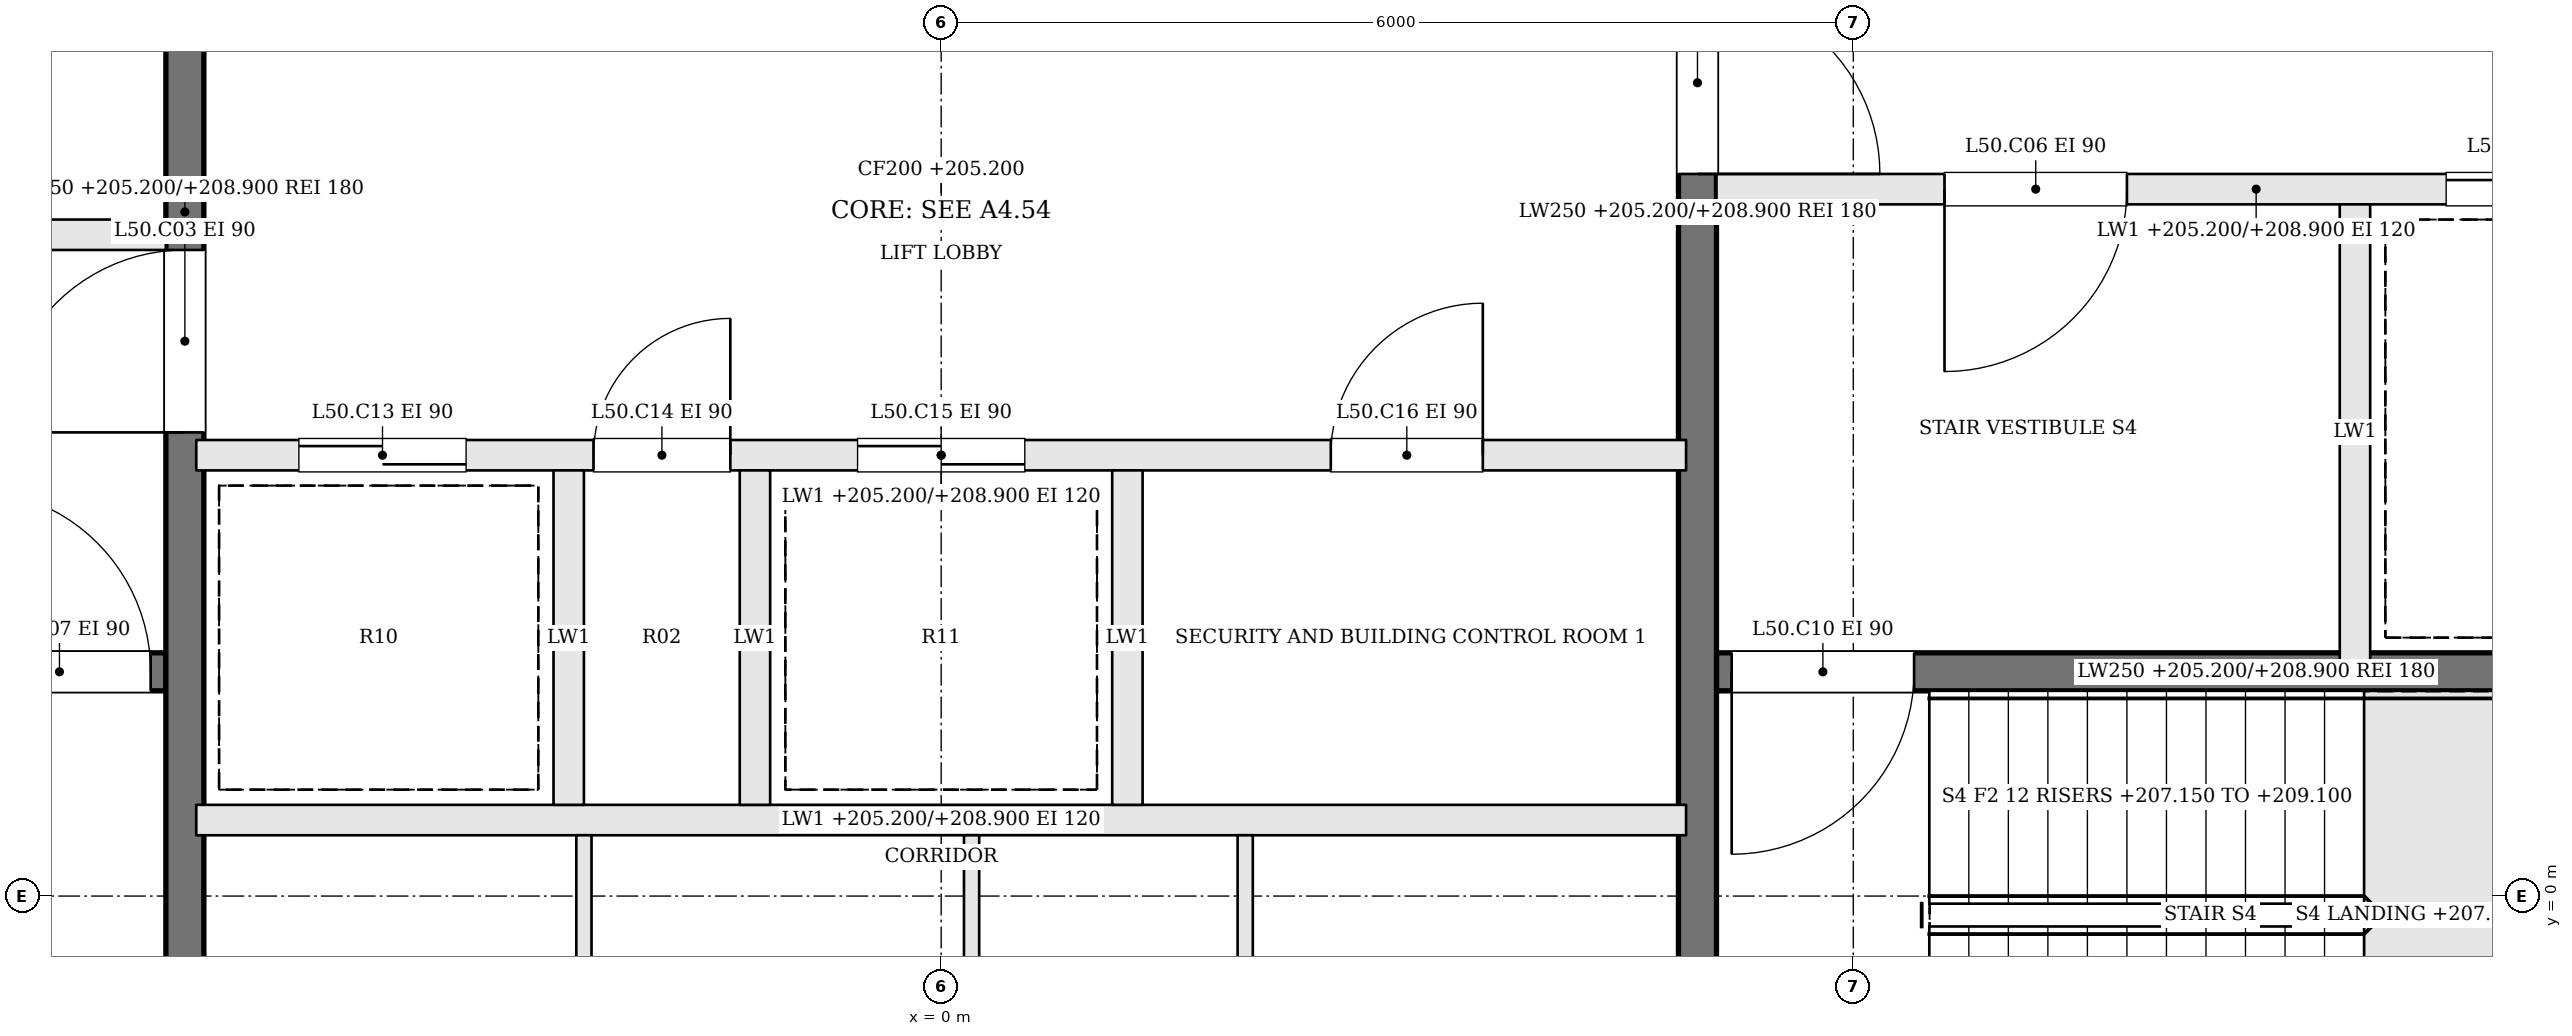
"""IFC4 building model, lengths in metres.
Left out: names, types, materials, properties, quantities, classifications, styles, units other than length and angle.
Written with IfcOpenShell. Run it as: python <this file> out.ifc"""

import sys

from ifc_helpers import new_model, si_unit, direction, frame, frame_2d, origin, place, context, subcontext, project, spatial, rectangle, extrude, element, fill, save


model = new_model("IFC4")
c1 = context("Model", 3, precision=1e-05, world=origin(), true_north=direction((0.0, 1.0)))
c2 = subcontext(c1, "Body", "Model", "MODEL_VIEW")
j1 = project(units=[si_unit("LENGTHUNIT", "METRE"), si_unit("PLANEANGLEUNIT", "RADIAN")], contexts=[c1])
p1 = place(None, origin())
s1 = spatial("IfcSite", under=j1, at=p1, CompositionType="ELEMENT")
p2 = place(p1, origin())
s2 = spatial("IfcBuilding", under=s1, at=p2, CompositionType="ELEMENT")
p3 = place(p2, frame((0.0, 0.0, 205.2)))
s3 = spatial("IfcBuildingStorey", under=s2, at=p3, CompositionType="ELEMENT", Elevation=205.2)
p4 = place(p3, frame((-12.2, 1.475, 0.0), z_axis=(0.0, 0.0, 1.0), x_axis=(1.0, 0.0, 0.0)))
e1 = element("IfcWall", 1, at=p4, inside=s3, PredefinedType="SOLIDWALL", context=c2, shape_type="SweptSolid", body=[
    extrude(rectangle(XDim=7.1, YDim=0.25, at=frame_2d((3.55, 0.0))), origin(), (0.0, 0.0, 1.0), 3.7),
])
p5 = place(p4, frame((5.8, 0.0, 0.0)))
e2 = element("IfcOpeningElement", 2, at=p5, cuts=e1, PredefinedType="OPENING", context=c2, shape_type="SweptSolid", body=[
    extrude(rectangle(XDim=1.2, YDim=2.1, at=frame_2d((0.6, 1.05))), frame((0.0, 0.135, 0.0), z_axis=(0.0, -1.0, 0.0), x_axis=(1.0, 0.0, 0.0)), (0.0, 0.0, 1.0), 0.27),
])
p6 = place(p3, frame((-12.2, 4.35, 0.0), z_axis=(0.0, 0.0, 1.0), x_axis=(1.0, 0.0, 0.0)))
e3 = element("IfcWall", 3, at=p6, inside=s3, PredefinedType="SOLIDWALL", context=c2, shape_type="SweptSolid", body=[
    extrude(rectangle(XDim=7.1, YDim=0.2, at=frame_2d((3.55, 0.0))), origin(), (0.0, 0.0, 1.0), 3.7),
])
p7 = place(p6, frame((4.4, 0.0, 0.0)))
e4 = element("IfcOpeningElement", 4, at=p7, cuts=e3, PredefinedType="OPENING", context=c2, shape_type="SweptSolid", body=[
    extrude(rectangle(XDim=1.2, YDim=2.1, at=frame_2d((0.6, 1.05))), frame((0.0, 0.11, 0.0), z_axis=(0.0, -1.0, 0.0), x_axis=(1.0, 0.0, 0.0)), (0.0, 0.0, 1.0), 0.22),
])
p8 = place(p6, frame((1.1, 0.0, 0.0)))
e5 = element("IfcOpeningElement", 5, at=p8, cuts=e3, PredefinedType="OPENING", context=c2, shape_type="SweptSolid", body=[
    extrude(rectangle(XDim=1.2, YDim=2.1, at=frame_2d((0.6, 1.05))), frame((0.0, 0.11, 0.0), z_axis=(0.0, -1.0, 0.0), x_axis=(1.0, 0.0, 0.0)), (0.0, 0.0, 1.0), 0.22),
])
p9 = place(p3, frame((12.2, 4.65, 0.0), z_axis=(0.0, 0.0, 1.0), x_axis=(-1.0, 0.0, 0.0)))
e6 = element("IfcWall", 6, at=p9, inside=s3, PredefinedType="SOLIDWALL", context=c2, shape_type="SweptSolid", body=[
    extrude(rectangle(XDim=7.1, YDim=0.2, at=frame_2d((3.55, 0.0))), origin(), (0.0, 0.0, 1.0), 3.7),
])
p10 = place(p9, frame((4.4, 0.0, 0.0)))
e7 = element("IfcOpeningElement", 7, at=p10, cuts=e6, PredefinedType="OPENING", context=c2, shape_type="SweptSolid", body=[
    extrude(rectangle(XDim=1.2, YDim=2.1, at=frame_2d((0.6, 1.05))), frame((0.0, 0.11, 0.0), z_axis=(0.0, -1.0, 0.0), x_axis=(1.0, 0.0, 0.0)), (0.0, 0.0, 1.0), 0.22),
])
p11 = place(p9, frame((1.1, 0.0, 0.0)))
e8 = element("IfcOpeningElement", 8, at=p11, cuts=e6, PredefinedType="OPENING", context=c2, shape_type="SweptSolid", body=[
    extrude(rectangle(XDim=1.2, YDim=2.1, at=frame_2d((0.6, 1.05))), frame((0.0, 0.11, 0.0), z_axis=(0.0, -1.0, 0.0), x_axis=(1.0, 0.0, 0.0)), (0.0, 0.0, 1.0), 0.22),
])
p12 = place(p3, frame((12.2, 1.475, 0.0), z_axis=(0.0, 0.0, 1.0), x_axis=(-1.0, 0.0, 0.0)))
e9 = element("IfcWall", 9, at=p12, inside=s3, PredefinedType="SOLIDWALL", context=c2, shape_type="SweptSolid", body=[
    extrude(rectangle(XDim=7.1, YDim=0.25, at=frame_2d((3.55, 0.0))), origin(), (0.0, 0.0, 1.0), 3.7),
])
p13 = place(p12, frame((5.8, 0.0, 0.0)))
e10 = element("IfcOpeningElement", 10, at=p13, cuts=e9, PredefinedType="OPENING", context=c2, shape_type="SweptSolid", body=[
    extrude(rectangle(XDim=1.2, YDim=2.1, at=frame_2d((0.6, 1.05))), frame((0.0, 0.135, 0.0), z_axis=(0.0, -1.0, 0.0), x_axis=(1.0, 0.0, 0.0)), (0.0, 0.0, 1.0), 0.27),
])
p14 = place(p3, frame((9.3, 4.55, 0.0), z_axis=(0.0, 0.0, 1.0), x_axis=(0.0, -1.0, 0.0)))
e11 = element("IfcWall", 11, at=p14, inside=s3, PredefinedType="SOLIDWALL", context=c2, shape_type="SweptSolid", body=[
    extrude(rectangle(XDim=3.0, YDim=0.2, at=frame_2d((1.5, 0.0))), origin(), (0.0, 0.0, 1.0), 3.7),
])
p15 = place(p3, frame((-4.975, -2.2, 0.0), z_axis=(0.0, 0.0, 1.0), x_axis=(0.0, 1.0, 0.0)))
e12 = element("IfcWall", 12, at=p15, inside=s3, PredefinedType="SOLIDWALL", context=c2, shape_type="SweptSolid", body=[
    extrude(rectangle(XDim=13.4, YDim=0.25, at=frame_2d((6.7, 0.0))), origin(), (0.0, 0.0, 1.0), 3.7),
])
p16 = place(p15, frame((5.25, 0.0, 0.0)))
e13 = element("IfcOpeningElement", 13, at=p16, cuts=e12, PredefinedType="OPENING", context=c2, shape_type="SweptSolid", body=[
    extrude(rectangle(XDim=1.2, YDim=2.1, at=frame_2d((0.6, 1.05))), frame((0.0, 0.135, 0.0), z_axis=(0.0, -1.0, 0.0), x_axis=(1.0, 0.0, 0.0)), (0.0, 0.0, 1.0), 0.27),
])
p17 = place(p3, frame((4.975, 11.2, 0.0), z_axis=(0.0, 0.0, 1.0), x_axis=(0.0, -1.0, 0.0)))
e14 = element("IfcWall", 14, at=p17, inside=s3, PredefinedType="SOLIDWALL", context=c2, shape_type="SweptSolid", body=[
    extrude(rectangle(XDim=13.4, YDim=0.25, at=frame_2d((6.7, 0.0))), origin(), (0.0, 0.0, 1.0), 3.7),
])
p18 = place(p17, frame((5.25, 0.0, 0.0)))
e15 = element("IfcOpeningElement", 15, at=p18, cuts=e14, PredefinedType="OPENING", context=c2, shape_type="SweptSolid", body=[
    extrude(rectangle(XDim=1.2, YDim=2.1, at=frame_2d((0.6, 1.05))), frame((0.0, 0.135, 0.0), z_axis=(0.0, -1.0, 0.0), x_axis=(1.0, 0.0, 0.0)), (0.0, 0.0, 1.0), 0.27),
])
p19 = place(p3, frame((-4.9, 0.5, 0.0), z_axis=(0.0, 0.0, 1.0), x_axis=(1.0, 0.0, 0.0)))
e16 = element("IfcWall", 16, at=p19, inside=s3, PredefinedType="SOLIDWALL", context=c2, shape_type="SweptSolid", body=[
    extrude(rectangle(XDim=9.8, YDim=0.2, at=frame_2d((4.9, 0.0))), origin(), (0.0, 0.0, 1.0), 3.7),
])
p20 = place(p3, frame((-4.9, 2.9, 0.0), z_axis=(0.0, 0.0, 1.0), x_axis=(1.0, 0.0, 0.0)))
e17 = element("IfcWall", 17, at=p20, inside=s3, PredefinedType="SOLIDWALL", context=c2, shape_type="SweptSolid", body=[
    extrude(rectangle(XDim=9.8, YDim=0.2, at=frame_2d((4.9, 0.0))), origin(), (0.0, 0.0, 1.0), 3.7),
])
p21 = place(p20, frame((0.675, 0.0, 0.0)))
e18 = element("IfcOpeningElement", 18, at=p21, cuts=e17, PredefinedType="OPENING", context=c2, shape_type="SweptSolid", body=[
    extrude(rectangle(XDim=1.1, YDim=2.1, at=frame_2d((0.55, 1.05))), frame((0.0, 0.11, 0.0), z_axis=(0.0, -1.0, 0.0), x_axis=(1.0, 0.0, 0.0)), (0.0, 0.0, 1.0), 0.22),
])
p22 = place(p20, frame((2.613, 0.0, 0.0)))
e19 = element("IfcOpeningElement", 19, at=p22, cuts=e17, PredefinedType="OPENING", context=c2, shape_type="SweptSolid", body=[
    extrude(rectangle(XDim=0.9, YDim=2.1, at=frame_2d((0.45, 1.05))), frame((0.0, 0.11, 0.0), z_axis=(0.0, -1.0, 0.0), x_axis=(1.0, 0.0, 0.0)), (0.0, 0.0, 1.0), 0.22),
])
p23 = place(p20, frame((4.35, 0.0, 0.0)))
e20 = element("IfcOpeningElement", 20, at=p23, cuts=e17, PredefinedType="OPENING", context=c2, shape_type="SweptSolid", body=[
    extrude(rectangle(XDim=1.1, YDim=2.1, at=frame_2d((0.55, 1.05))), frame((0.0, 0.11, 0.0), z_axis=(0.0, -1.0, 0.0), x_axis=(1.0, 0.0, 0.0)), (0.0, 0.0, 1.0), 0.22),
])
p24 = place(p20, frame((7.463, 0.0, 0.0)))
e21 = element("IfcOpeningElement", 21, at=p24, cuts=e17, PredefinedType="OPENING", context=c2, shape_type="SweptSolid", body=[
    extrude(rectangle(XDim=1.0, YDim=2.1, at=frame_2d((0.5, 1.05))), frame((0.0, 0.11, 0.0), z_axis=(0.0, -1.0, 0.0), x_axis=(1.0, 0.0, 0.0)), (0.0, 0.0, 1.0), 0.22),
])
for number, where, z_axis, x_axis in (
    (22, (-2.45, 0.6, 0.0), (0.0, 0.0, 1.0), (0.0, 1.0, 0.0)),
    (23, (-1.225, 0.6, 0.0), (0.0, 0.0, 1.0), (0.0, 1.0, 0.0)),
    (24, (1.225, 0.6, 0.0), (0.0, 0.0, 1.0), (0.0, 1.0, 0.0)),
):
    element("IfcWall", number, at=place(p3, frame(where, z_axis=z_axis, x_axis=x_axis)), inside=s3, PredefinedType="SOLIDWALL", context=c2, shape_type="SweptSolid", body=[
        extrude(rectangle(XDim=2.2, YDim=0.2, at=frame_2d((1.1, 0.0))), origin(), (0.0, 0.0, 1.0), 3.7),
    ])
for number, where, z_axis, x_axis in (
    (25, (-2.35, -2.2, 0.0), (0.0, 0.0, 1.0), (0.0, 1.0, 0.0)),
    (26, (0.2, -2.2, 0.0), (0.0, 0.0, 1.0), (0.0, 1.0, 0.0)),
    (27, (2.0, -2.2, 0.0), (0.0, 0.0, 1.0), (0.0, 1.0, 0.0)),
):
    element("IfcWall", number, at=place(p3, frame(where, z_axis=z_axis, x_axis=x_axis)), inside=s3, PredefinedType="PARTITIONING", context=c2, shape_type="SweptSolid", body=[
        extrude(rectangle(XDim=2.6, YDim=0.1, at=frame_2d((1.3, 0.0))), origin(), (0.0, 0.0, 1.0), 3.7),
    ])
p25 = place(p16, origin())
e28 = element("IfcDoor", 28, at=p25, inside=s3, OperationType="SINGLE_SWING_LEFT", PredefinedType="DOOR", context=c2, shape_type="SweptSolid", body=[
    extrude(rectangle(XDim=1.2, YDim=2.1, at=frame_2d((0.6, 1.05))), frame((0.0, 0.025, 0.0), z_axis=(0.0, -1.0, 0.0), x_axis=(1.0, 0.0, 0.0)), (0.0, 0.0, 1.0), 0.05),
])
fill(e13, e28)
p26 = place(p18, origin())
e29 = element("IfcDoor", 29, at=p26, inside=s3, OperationType="SINGLE_SWING_RIGHT", PredefinedType="DOOR", context=c2, shape_type="SweptSolid", body=[
    extrude(rectangle(XDim=1.2, YDim=2.1, at=frame_2d((0.6, 1.05))), frame((0.0, 0.025, 0.0), z_axis=(0.0, -1.0, 0.0), x_axis=(1.0, 0.0, 0.0)), (0.0, 0.0, 1.0), 0.05),
])
fill(e15, e29)
p27 = place(p10, origin())
e30 = element("IfcDoor", 30, at=p27, inside=s3, OperationType="SINGLE_SWING_RIGHT", PredefinedType="DOOR", context=c2, shape_type="SweptSolid", body=[
    extrude(rectangle(XDim=1.2, YDim=2.1, at=frame_2d((0.6, 1.05))), frame((0.0, 0.025, 0.0), z_axis=(0.0, -1.0, 0.0), x_axis=(1.0, 0.0, 0.0)), (0.0, 0.0, 1.0), 0.05),
])
fill(e7, e30)
p28 = place(p5, origin())
e31 = element("IfcDoor", 31, at=p28, inside=s3, OperationType="SINGLE_SWING_LEFT", PredefinedType="DOOR", context=c2, shape_type="SweptSolid", body=[
    extrude(rectangle(XDim=1.2, YDim=2.1, at=frame_2d((0.6, 1.05))), frame((0.0, 0.025, 0.0), z_axis=(0.0, -1.0, 0.0), x_axis=(1.0, 0.0, 0.0)), (0.0, 0.0, 1.0), 0.05),
])
fill(e2, e31)
p29 = place(p13, origin())
e32 = element("IfcDoor", 32, at=p29, inside=s3, OperationType="SINGLE_SWING_RIGHT", PredefinedType="DOOR", context=c2, shape_type="SweptSolid", body=[
    extrude(rectangle(XDim=1.2, YDim=2.1, at=frame_2d((0.6, 1.05))), frame((0.0, 0.025, 0.0), z_axis=(0.0, -1.0, 0.0), x_axis=(1.0, 0.0, 0.0)), (0.0, 0.0, 1.0), 0.05),
])
fill(e10, e32)
p30 = place(p11, origin())
e33 = element("IfcDoor", 33, at=p30, inside=s3, OperationType="SLIDING_TO_RIGHT", PredefinedType="DOOR", context=c2, shape_type="SweptSolid", body=[
    extrude(rectangle(XDim=1.2, YDim=2.1, at=frame_2d((0.6, 1.05))), frame((0.0, 0.025, 0.0), z_axis=(0.0, -1.0, 0.0), x_axis=(1.0, 0.0, 0.0)), (0.0, 0.0, 1.0), 0.05),
])
fill(e8, e33)
p31 = place(p21, origin())
e34 = element("IfcDoor", 34, at=p31, inside=s3, OperationType="SLIDING_TO_RIGHT", PredefinedType="DOOR", context=c2, shape_type="SweptSolid", body=[
    extrude(rectangle(XDim=1.1, YDim=2.1, at=frame_2d((0.55, 1.05))), frame((0.0, 0.025, 0.0), z_axis=(0.0, -1.0, 0.0), x_axis=(1.0, 0.0, 0.0)), (0.0, 0.0, 1.0), 0.05),
])
fill(e18, e34)
p32 = place(p22, origin())
e35 = element("IfcDoor", 35, at=p32, inside=s3, OperationType="SINGLE_SWING_RIGHT", PredefinedType="DOOR", context=c2, shape_type="SweptSolid", body=[
    extrude(rectangle(XDim=0.9, YDim=2.1, at=frame_2d((0.45, 1.05))), frame((0.0, 0.025, 0.0), z_axis=(0.0, -1.0, 0.0), x_axis=(1.0, 0.0, 0.0)), (0.0, 0.0, 1.0), 0.05),
])
fill(e19, e35)
p33 = place(p23, origin())
e36 = element("IfcDoor", 36, at=p33, inside=s3, OperationType="SLIDING_TO_LEFT", PredefinedType="DOOR", context=c2, shape_type="SweptSolid", body=[
    extrude(rectangle(XDim=1.1, YDim=2.1, at=frame_2d((0.55, 1.05))), frame((0.0, 0.025, 0.0), z_axis=(0.0, -1.0, 0.0), x_axis=(1.0, 0.0, 0.0)), (0.0, 0.0, 1.0), 0.05),
])
fill(e20, e36)
p34 = place(p24, origin())
e37 = element("IfcDoor", 37, at=p34, inside=s3, OperationType="SINGLE_SWING_RIGHT", PredefinedType="DOOR", context=c2, shape_type="SweptSolid", body=[
    extrude(rectangle(XDim=1.0, YDim=2.1, at=frame_2d((0.5, 1.05))), frame((0.0, 0.025, 0.0), z_axis=(0.0, -1.0, 0.0), x_axis=(1.0, 0.0, 0.0)), (0.0, 0.0, 1.0), 0.05),
])
fill(e21, e37)
save(model, sys.argv[1])
